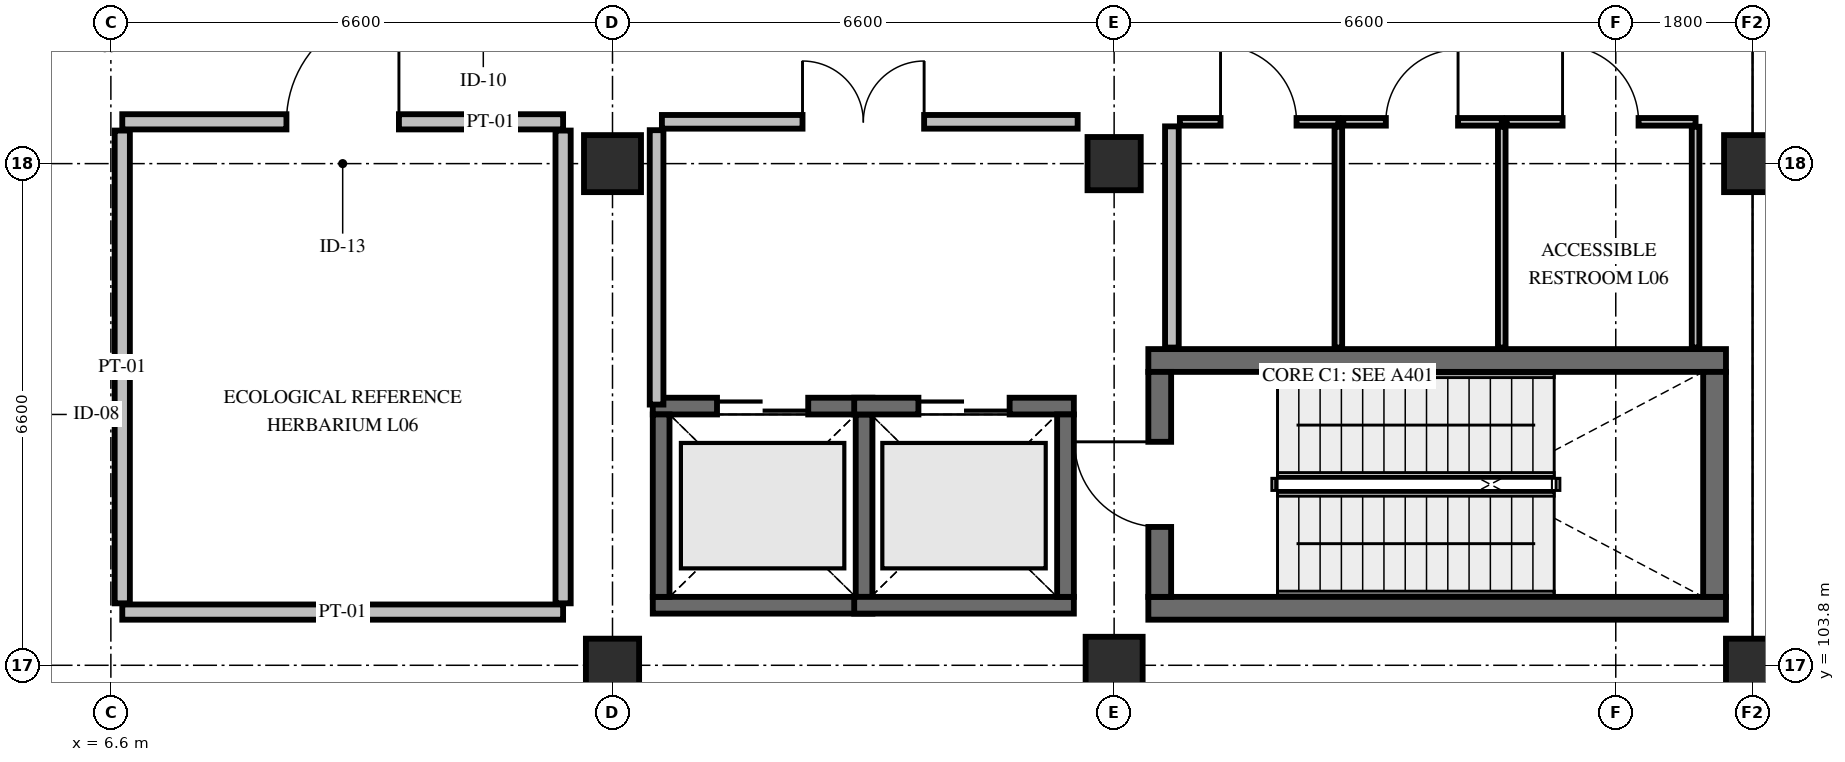
"""IFC4 building model, lengths in metres.
Left out: names, types, materials, properties, quantities, classifications, styles, units other than length and angle.
Written with IfcOpenShell. Run it as: python <this file> out.ifc"""

import sys

from ifc_helpers import new_model, si_unit, direction, frame, frame_2d, origin, origin_2d, place, context, subcontext, project, spatial, rectangle, extrude, element, fill, save


model = new_model("IFC4")
c1 = context("Model", 3, precision=1e-05, world=origin(), true_north=direction((0.0, 1.0)))
c2 = subcontext(c1, "Body", "Model", "MODEL_VIEW")
j1 = project(units=[si_unit("LENGTHUNIT", "METRE"), si_unit("PLANEANGLEUNIT", "RADIAN")], contexts=[c1])
p1 = place(None, origin())
s1 = spatial("IfcSite", under=j1, at=p1, CompositionType="ELEMENT")
p2 = place(p1, origin())
s2 = spatial("IfcBuilding", under=s1, at=p2, CompositionType="ELEMENT")
p3 = place(p2, frame((0.0, 0.0, 29.4)))
s3 = spatial("IfcBuildingStorey", under=s2, at=p3, CompositionType="ELEMENT", Elevation=29.4)
p4 = place(p3, frame((13.2, 103.8, 0.0), z_axis=(0.0, 0.0, 1.0), x_axis=(1.0, 0.0, 0.0)))
e1 = element("IfcColumn", 1, at=p4, inside=s3, PredefinedType="COLUMN", context=c2, shape_type="SweptSolid", body=[
    extrude(rectangle(XDim=0.7, YDim=0.7, at=origin_2d()), origin(), (0.0, 0.0, 1.0), 4.8),
])
for number, where, z_axis, x_axis in (
    (2, (13.2, 110.4, 0.0), (0.0, 0.0, 1.0), (1.0, 0.0, 0.0)),
    (3, (19.8, 103.8, 0.0), (0.0, 0.0, 1.0), (1.0, 0.0, 0.0)),
):
    element("IfcColumn", number, at=place(p3, frame(where, z_axis=z_axis, x_axis=x_axis)), inside=s3, PredefinedType="COLUMN", context=c2, shape_type="SweptSolid", body=[
        extrude(rectangle(XDim=0.75, YDim=0.75, at=origin_2d()), origin(), (0.0, 0.0, 1.0), 4.8),
    ])
for number, where, z_axis, x_axis in (
    (4, (19.8, 110.4, 0.0), (0.0, 0.0, 1.0), (1.0, 0.0, 0.0)),
    (5, (28.2, 103.8, 0.0), (0.0, 0.0, 1.0), (1.0, 0.0, 0.0)),
):
    element("IfcColumn", number, at=place(p3, frame(where, z_axis=z_axis, x_axis=x_axis)), inside=s3, PredefinedType="COLUMN", context=c2, shape_type="SweptSolid", body=[
        extrude(rectangle(XDim=0.7, YDim=0.7, at=origin_2d()), origin(), (0.0, 0.0, 1.0), 4.8),
    ])
p5 = place(p3, frame((28.2, 110.4, 0.0), z_axis=(0.0, 0.0, 1.0), x_axis=(1.0, 0.0, 0.0)))
e6 = element("IfcColumn", 6, at=p5, inside=s3, PredefinedType="COLUMN", context=c2, shape_type="SweptSolid", body=[
    extrude(rectangle(XDim=0.75, YDim=0.75, at=origin_2d()), origin(), (0.0, 0.0, 1.0), 4.8),
])
for number, where, z_axis, x_axis in (
    (7, (20.25, 104.55, 0.0), (0.0, 0.0, 1.0), (1.0, 0.0, 0.0)),
    (8, (20.25, 107.81, 0.0), (0.0, 0.0, 1.0), (1.0, 0.0, 0.0)),
):
    element("IfcWall", number, at=place(p3, frame(where, z_axis=z_axis, x_axis=x_axis)), inside=s3, PredefinedType="SHEAR", context=c2, shape_type="SweptSolid", body=[
        extrude(rectangle(XDim=7.6, YDim=0.3, at=frame_2d((3.8, 0.0))), origin(), (0.0, 0.0, 1.0), 4.52),
    ])
p6 = place(p3, frame((20.4, 104.7, 0.0), z_axis=(0.0, 0.0, 1.0), x_axis=(0.0, 1.0, 0.0)))
e9 = element("IfcWall", 9, at=p6, inside=s3, PredefinedType="SHEAR", context=c2, shape_type="SweptSolid", body=[
    extrude(rectangle(XDim=2.96, YDim=0.3, at=frame_2d((1.48, 0.0))), origin(), (0.0, 0.0, 1.0), 4.52),
])
p7 = place(p6, frame((0.92, 0.0, 0.0)))
e10 = element("IfcOpeningElement", 10, at=p7, cuts=e9, PredefinedType="OPENING", context=c2, shape_type="SweptSolid", body=[
    extrude(rectangle(XDim=1.12, YDim=2.2, at=frame_2d((0.56, 1.1))), frame((0.0, 0.165, 0.0), z_axis=(0.0, -1.0, 0.0), x_axis=(1.0, 0.0, 0.0)), (0.0, 0.0, 1.0), 0.33),
])
p8 = place(p3, frame((27.7, 104.7, 0.0), z_axis=(0.0, 0.0, 1.0), x_axis=(0.0, 1.0, 0.0)))
e11 = element("IfcWall", 11, at=p8, inside=s3, PredefinedType="SHEAR", context=c2, shape_type="SweptSolid", body=[
    extrude(rectangle(XDim=2.96, YDim=0.3, at=frame_2d((1.48, 0.0))), origin(), (0.0, 0.0, 1.0), 4.52),
])
p9 = place(p3, frame((13.73, 104.59, 0.0), z_axis=(0.0, 0.0, 1.0), x_axis=(1.0, 0.0, 0.0)))
e12 = element("IfcWall", 12, at=p9, inside=s3, PredefinedType="SHEAR", context=c2, shape_type="SweptSolid", body=[
    extrude(rectangle(XDim=2.89, YDim=0.22, at=frame_2d((1.445, 0.0))), origin(), (0.0, 0.0, 1.0), 4.52),
])
p10 = place(p3, frame((13.73, 107.21, 0.0), z_axis=(0.0, 0.0, 1.0), x_axis=(1.0, 0.0, 0.0)))
e13 = element("IfcWall", 13, at=p10, inside=s3, PredefinedType="SHEAR", context=c2, shape_type="SweptSolid", body=[
    extrude(rectangle(XDim=2.89, YDim=0.22, at=frame_2d((1.445, 0.0))), origin(), (0.0, 0.0, 1.0), 4.52),
])
p11 = place(p10, frame((0.845, 0.0, 0.0)))
e14 = element("IfcOpeningElement", 14, at=p11, cuts=e13, PredefinedType="OPENING", context=c2, shape_type="SweptSolid", body=[
    extrude(rectangle(XDim=1.2, YDim=2.2, at=frame_2d((0.6, 1.1))), frame((0.0, 0.125, 0.0), z_axis=(0.0, -1.0, 0.0), x_axis=(1.0, 0.0, 0.0)), (0.0, 0.0, 1.0), 0.25),
])
for number, where, z_axis, x_axis in (
    (15, (13.84, 104.7, 0.0), (0.0, 0.0, 1.0), (0.0, 1.0, 0.0)),
    (16, (16.51, 104.7, 0.0), (0.0, 0.0, 1.0), (0.0, 1.0, 0.0)),
):
    element("IfcWall", number, at=place(p3, frame(where, z_axis=z_axis, x_axis=x_axis)), inside=s3, PredefinedType="SHEAR", context=c2, shape_type="SweptSolid", body=[
        extrude(rectangle(XDim=2.4, YDim=0.22, at=frame_2d((1.2, 0.0))), origin(), (0.0, 0.0, 1.0), 4.52),
    ])
p12 = place(p3, frame((16.38, 104.59, 0.0), z_axis=(0.0, 0.0, 1.0), x_axis=(1.0, 0.0, 0.0)))
e17 = element("IfcWall", 17, at=p12, inside=s3, PredefinedType="SHEAR", context=c2, shape_type="SweptSolid", body=[
    extrude(rectangle(XDim=2.89, YDim=0.22, at=frame_2d((1.445, 0.0))), origin(), (0.0, 0.0, 1.0), 4.52),
])
p13 = place(p3, frame((16.38, 107.21, 0.0), z_axis=(0.0, 0.0, 1.0), x_axis=(1.0, 0.0, 0.0)))
e18 = element("IfcWall", 18, at=p13, inside=s3, PredefinedType="SHEAR", context=c2, shape_type="SweptSolid", body=[
    extrude(rectangle(XDim=2.89, YDim=0.22, at=frame_2d((1.445, 0.0))), origin(), (0.0, 0.0, 1.0), 4.52),
])
p14 = place(p13, frame((0.845, 0.0, 0.0)))
e19 = element("IfcOpeningElement", 19, at=p14, cuts=e18, PredefinedType="OPENING", context=c2, shape_type="SweptSolid", body=[
    extrude(rectangle(XDim=1.2, YDim=2.2, at=frame_2d((0.6, 1.1))), frame((0.0, 0.125, 0.0), z_axis=(0.0, -1.0, 0.0), x_axis=(1.0, 0.0, 0.0)), (0.0, 0.0, 1.0), 0.25),
])
p15 = place(p3, frame((19.16, 104.7, 0.0), z_axis=(0.0, 0.0, 1.0), x_axis=(0.0, 1.0, 0.0)))
e20 = element("IfcWall", 20, at=p15, inside=s3, PredefinedType="SHEAR", context=c2, shape_type="SweptSolid", body=[
    extrude(rectangle(XDim=2.4, YDim=0.22, at=frame_2d((1.2, 0.0))), origin(), (0.0, 0.0, 1.0), 4.52),
])
p16 = place(p3, frame((13.85, 110.95, 0.0), z_axis=(0.0, 0.0, 1.0), x_axis=(1.0, 0.0, 0.0)))
e21 = element("IfcWall", 21, at=p16, inside=s3, PredefinedType="PARTITIONING", context=c2, shape_type="SweptSolid", body=[
    extrude(rectangle(XDim=5.47, YDim=0.18, at=frame_2d((2.735, 0.0))), origin(), (0.0, 0.0, 1.0), 4.345),
])
p17 = place(p16, frame((1.85, 0.0, 0.0)))
e22 = element("IfcOpeningElement", 22, at=p17, cuts=e21, PredefinedType="OPENING", context=c2, shape_type="SweptSolid", body=[
    extrude(rectangle(XDim=1.6, YDim=2.25, at=frame_2d((0.8, 1.125))), frame((0.0, 0.105, 0.0), z_axis=(0.0, -1.0, 0.0), x_axis=(1.0, 0.0, 0.0)), (0.0, 0.0, 1.0), 0.21),
])
p18 = place(p3, frame((13.78, 107.23, 0.0), z_axis=(0.0, 0.0, 1.0), x_axis=(0.0, 1.0, 0.0)))
e23 = element("IfcWall", 23, at=p18, inside=s3, PredefinedType="PARTITIONING", context=c2, shape_type="SweptSolid", body=[
    extrude(rectangle(XDim=3.61, YDim=0.18, at=frame_2d((1.805, 0.0))), origin(), (0.0, 0.0, 1.0), 4.18),
])
p19 = place(p3, frame((20.56, 107.98, 0.0), z_axis=(0.0, 0.0, 1.0), x_axis=(0.0, 1.0, 0.0)))
e24 = element("IfcWall", 24, at=p19, inside=s3, PredefinedType="PARTITIONING", context=c2, shape_type="SweptSolid", body=[
    extrude(rectangle(XDim=2.91, YDim=0.18, at=frame_2d((1.455, 0.0))), origin(), (0.0, 0.0, 1.0), 3.83),
])
p20 = place(p3, frame((20.665, 110.95, 0.0), z_axis=(0.0, 0.0, 1.0), x_axis=(1.0, 0.0, 0.0)))
e25 = element("IfcWall", 25, at=p20, inside=s3, PredefinedType="PARTITIONING", context=c2, shape_type="SweptSolid", body=[
    extrude(rectangle(XDim=2.085, YDim=0.1, at=frame_2d((1.042, 0.0))), origin(), (0.0, 0.0, 1.0), 4.345),
])
p21 = place(p20, frame((0.535, 0.0, 0.0)))
e26 = element("IfcOpeningElement", 26, at=p21, cuts=e25, PredefinedType="OPENING", context=c2, shape_type="SweptSolid", body=[
    extrude(rectangle(XDim=1.0, YDim=2.15, at=frame_2d((0.5, 1.075))), frame((0.0, 0.065, 0.0), z_axis=(0.0, -1.0, 0.0), x_axis=(1.0, 0.0, 0.0)), (0.0, 0.0, 1.0), 0.13),
])
p22 = place(p3, frame((22.75, 107.98, 0.0), z_axis=(0.0, 0.0, 1.0), x_axis=(0.0, 1.0, 0.0)))
e27 = element("IfcWall", 27, at=p22, inside=s3, PredefinedType="PARTITIONING", context=c2, shape_type="SweptSolid", body=[
    extrude(rectangle(XDim=2.905, YDim=0.1, at=frame_2d((1.453, 0.0))), origin(), (0.0, 0.0, 1.0), 3.83),
])
p23 = place(p3, frame((22.815, 110.95, 0.0), z_axis=(0.0, 0.0, 1.0), x_axis=(1.0, 0.0, 0.0)))
e28 = element("IfcWall", 28, at=p23, inside=s3, PredefinedType="PARTITIONING", context=c2, shape_type="SweptSolid", body=[
    extrude(rectangle(XDim=2.085, YDim=0.1, at=frame_2d((1.042, 0.0))), origin(), (0.0, 0.0, 1.0), 4.5),
])
p24 = place(p23, frame((0.56, 0.0, 0.0)))
e29 = element("IfcOpeningElement", 29, at=p24, cuts=e28, PredefinedType="OPENING", context=c2, shape_type="SweptSolid", body=[
    extrude(rectangle(XDim=0.95, YDim=2.15, at=frame_2d((0.475, 1.075))), frame((0.0, 0.065, 0.0), z_axis=(0.0, -1.0, 0.0), x_axis=(1.0, 0.0, 0.0)), (0.0, 0.0, 1.0), 0.13),
])
p25 = place(p3, frame((24.9, 107.98, 0.0), z_axis=(0.0, 0.0, 1.0), x_axis=(0.0, 1.0, 0.0)))
e30 = element("IfcWall", 30, at=p25, inside=s3, PredefinedType="PARTITIONING", context=c2, shape_type="SweptSolid", body=[
    extrude(rectangle(XDim=2.905, YDim=0.1, at=frame_2d((1.453, 0.0))), origin(), (0.0, 0.0, 1.0), 3.83),
])
p26 = place(p3, frame((24.965, 110.95, 0.0), z_axis=(0.0, 0.0, 1.0), x_axis=(1.0, 0.0, 0.0)))
e31 = element("IfcWall", 31, at=p26, inside=s3, PredefinedType="PARTITIONING", context=c2, shape_type="SweptSolid", body=[
    extrude(rectangle(XDim=2.485, YDim=0.1, at=frame_2d((1.242, 0.0))), origin(), (0.0, 0.0, 1.0), 4.345),
])
p27 = place(p26, frame((0.735, 0.0, 0.0)))
e32 = element("IfcOpeningElement", 32, at=p27, cuts=e31, PredefinedType="OPENING", context=c2, shape_type="SweptSolid", body=[
    extrude(rectangle(XDim=1.0, YDim=2.15, at=frame_2d((0.5, 1.075))), frame((0.0, 0.065, 0.0), z_axis=(0.0, -1.0, 0.0), x_axis=(1.0, 0.0, 0.0)), (0.0, 0.0, 1.0), 0.13),
])
p28 = place(p3, frame((27.45, 107.98, 0.0), z_axis=(0.0, 0.0, 1.0), x_axis=(0.0, 1.0, 0.0)))
e33 = element("IfcWall", 33, at=p28, inside=s3, PredefinedType="PARTITIONING", context=c2, shape_type="SweptSolid", body=[
    extrude(rectangle(XDim=2.905, YDim=0.1, at=frame_2d((1.453, 0.0))), origin(), (0.0, 0.0, 1.0), 3.83),
])
p29 = place(p3, frame((6.75, 104.5, 0.0), z_axis=(0.0, 0.0, 1.0), x_axis=(1.0, 0.0, 0.0)))
e34 = element("IfcWall", 34, at=p29, inside=s3, PredefinedType="PARTITIONING", context=c2, shape_type="SweptSolid", body=[
    extrude(rectangle(XDim=5.8, YDim=0.2, at=frame_2d((2.9, 0.0))), origin(), (0.0, 0.0, 1.0), 4.345),
])
p30 = place(p3, frame((6.75, 110.95, 0.0), z_axis=(0.0, 0.0, 1.0), x_axis=(1.0, 0.0, 0.0)))
e35 = element("IfcWall", 35, at=p30, inside=s3, PredefinedType="PARTITIONING", context=c2, shape_type="SweptSolid", body=[
    extrude(rectangle(XDim=5.8, YDim=0.2, at=frame_2d((2.9, 0.0))), origin(), (0.0, 0.0, 1.0), 4.345),
])
p31 = place(p30, frame((2.16, 0.0, 0.0)))
e36 = element("IfcOpeningElement", 36, at=p31, cuts=e35, PredefinedType="OPENING", context=c2, shape_type="SweptSolid", body=[
    extrude(rectangle(XDim=1.48, YDim=2.3, at=frame_2d((0.74, 1.15))), frame((0.0, 0.115, 0.0), z_axis=(0.0, -1.0, 0.0), x_axis=(1.0, 0.0, 0.0)), (0.0, 0.0, 1.0), 0.23),
])
for number, where, z_axis, x_axis in (
    (37, (6.75, 104.615, 0.0), (0.0, 0.0, 1.0), (0.0, 1.0, 0.0)),
    (38, (12.55, 104.615, 0.0), (0.0, 0.0, 1.0), (0.0, 1.0, 0.0)),
):
    element("IfcWall", number, at=place(p3, frame(where, z_axis=z_axis, x_axis=x_axis)), inside=s3, PredefinedType="PARTITIONING", context=c2, shape_type="SweptSolid", body=[
        extrude(rectangle(XDim=6.22, YDim=0.2, at=frame_2d((3.11, 0.0))), origin(), (0.0, 0.0, 1.0), 3.83),
    ])
p32 = place(p7, origin())
e39 = element("IfcDoor", 39, at=p32, inside=s3, OperationType="SINGLE_SWING_RIGHT", PredefinedType="DOOR", context=c2, shape_type="SweptSolid", body=[
    extrude(rectangle(XDim=1.12, YDim=2.2, at=frame_2d((0.56, 1.1))), frame((0.0, 0.025, 0.0), z_axis=(0.0, -1.0, 0.0), x_axis=(1.0, 0.0, 0.0)), (0.0, 0.0, 1.0), 0.05),
])
fill(e10, e39)
p33 = place(p11, origin())
e40 = element("IfcDoor", 40, at=p33, inside=s3, OperationType="DOUBLE_DOOR_SLIDING", PredefinedType="DOOR", context=c2, shape_type="SweptSolid", body=[
    extrude(rectangle(XDim=1.2, YDim=2.2, at=frame_2d((0.6, 1.1))), frame((0.0, 0.025, 0.0), z_axis=(0.0, -1.0, 0.0), x_axis=(1.0, 0.0, 0.0)), (0.0, 0.0, 1.0), 0.05),
])
fill(e14, e40)
p34 = place(p14, origin())
e41 = element("IfcDoor", 41, at=p34, inside=s3, OperationType="DOUBLE_DOOR_SLIDING", PredefinedType="DOOR", context=c2, shape_type="SweptSolid", body=[
    extrude(rectangle(XDim=1.2, YDim=2.2, at=frame_2d((0.6, 1.1))), frame((0.0, 0.025, 0.0), z_axis=(0.0, -1.0, 0.0), x_axis=(1.0, 0.0, 0.0)), (0.0, 0.0, 1.0), 0.05),
])
fill(e19, e41)
p35 = place(p17, origin())
e42 = element("IfcDoor", 42, at=p35, inside=s3, OperationType="DOUBLE_DOOR_SINGLE_SWING", PredefinedType="DOOR", context=c2, shape_type="SweptSolid", body=[
    extrude(rectangle(XDim=1.6, YDim=2.25, at=frame_2d((0.8, 1.125))), frame((0.0, 0.025, 0.0), z_axis=(0.0, -1.0, 0.0), x_axis=(1.0, 0.0, 0.0)), (0.0, 0.0, 1.0), 0.05),
])
fill(e22, e42)
p36 = place(p21, origin())
e43 = element("IfcDoor", 43, at=p36, inside=s3, OperationType="SINGLE_SWING_LEFT", PredefinedType="DOOR", context=c2, shape_type="SweptSolid", body=[
    extrude(rectangle(XDim=1.0, YDim=2.15, at=frame_2d((0.5, 1.075))), frame((0.0, 0.025, 0.0), z_axis=(0.0, -1.0, 0.0), x_axis=(1.0, 0.0, 0.0)), (0.0, 0.0, 1.0), 0.05),
])
fill(e26, e43)
p37 = place(p24, origin())
e44 = element("IfcDoor", 44, at=p37, inside=s3, OperationType="SINGLE_SWING_RIGHT", PredefinedType="DOOR", context=c2, shape_type="SweptSolid", body=[
    extrude(rectangle(XDim=0.95, YDim=2.15, at=frame_2d((0.475, 1.075))), frame((0.0, 0.025, 0.0), z_axis=(0.0, -1.0, 0.0), x_axis=(1.0, 0.0, 0.0)), (0.0, 0.0, 1.0), 0.05),
])
fill(e29, e44)
p38 = place(p27, origin())
e45 = element("IfcDoor", 45, at=p38, inside=s3, OperationType="SINGLE_SWING_LEFT", PredefinedType="DOOR", context=c2, shape_type="SweptSolid", body=[
    extrude(rectangle(XDim=1.0, YDim=2.15, at=frame_2d((0.5, 1.075))), frame((0.0, 0.025, 0.0), z_axis=(0.0, -1.0, 0.0), x_axis=(1.0, 0.0, 0.0)), (0.0, 0.0, 1.0), 0.05),
])
fill(e32, e45)
p39 = place(p31, origin())
e46 = element("IfcDoor", 46, at=p39, inside=s3, OperationType="SINGLE_SWING_RIGHT", PredefinedType="DOOR", context=c2, shape_type="SweptSolid", body=[
    extrude(rectangle(XDim=1.48, YDim=2.3, at=frame_2d((0.74, 1.15))), frame((0.0, 0.025, 0.0), z_axis=(0.0, -1.0, 0.0), x_axis=(1.0, 0.0, 0.0)), (0.0, 0.0, 1.0), 0.05),
])
fill(e36, e46)
save(model, sys.argv[1])
